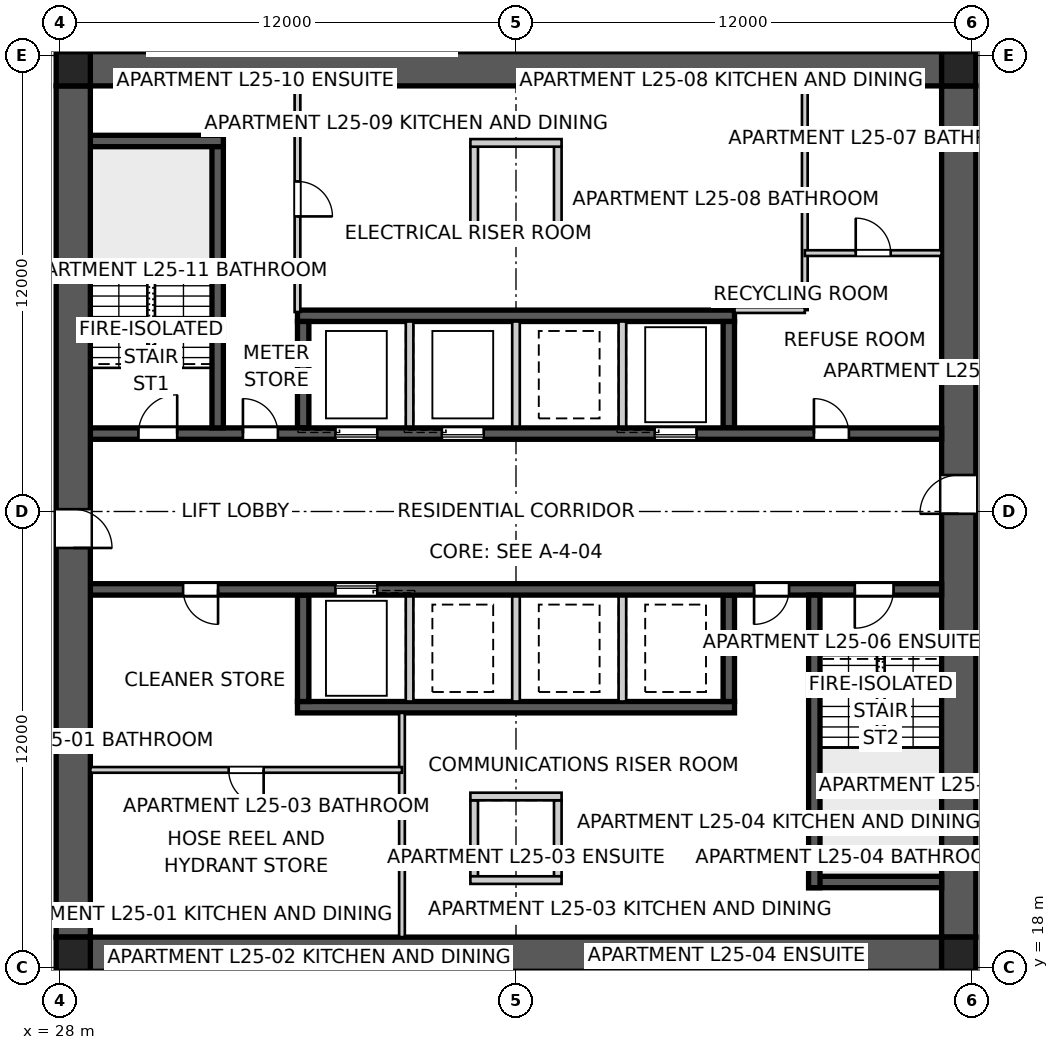
"""IFC4 building model, lengths in metres.
Left out: names, types, materials, properties, quantities, classifications, styles, units other than length and angle.
Written with IfcOpenShell. Run it as: python <this file> out.ifc"""

import sys

from ifc_helpers import new_model, si_unit, direction, frame, frame_2d, origin, origin_2d, place, context, subcontext, project, spatial, polyline, rectangle, outline, extrude, element, fill, save


model = new_model("IFC4")
c1 = context("Model", 3, precision=1e-05, world=origin(), true_north=direction((0.0, 1.0)))
c2 = subcontext(c1, "Body", "Model", "MODEL_VIEW")
j1 = project(units=[si_unit("LENGTHUNIT", "METRE"), si_unit("PLANEANGLEUNIT", "RADIAN")], contexts=[c1])
p1 = place(None, origin())
s1 = spatial("IfcSite", under=j1, at=p1, CompositionType="ELEMENT")
p2 = place(p1, origin())
s2 = spatial("IfcBuilding", under=s1, at=p2, CompositionType="ELEMENT")
p3 = place(p2, frame((0.0, 0.0, 93.0)))
s3 = spatial("IfcBuildingStorey", under=s2, at=p3, CompositionType="ELEMENT", Elevation=93.0)
for number, where, z_axis, x_axis in (
    (1, (28.8, 41.65, 0.0), (0.0, 0.0, 1.0), (1.0, 0.0, 0.0)),
    (2, (51.2, 18.35, 0.0), (0.0, 0.0, 1.0), (-1.0, 0.0, 0.0)),
):
    element("IfcWall", number, at=place(p3, frame(where, z_axis=z_axis, x_axis=x_axis)), inside=s3, PredefinedType="SHEAR", context=c2, shape_type="SweptSolid", body=[
        extrude(outline(polyline([(0.0, -0.45), (22.4, -0.45), (22.4, -0.025), (22.85, -0.025), (22.85, 0.025), (22.4, 0.025), (22.4, 0.45), (0.0, 0.45), (0.0, 0.025), (-0.45, 0.025), (-0.45, -0.025), (0.0, -0.025), (0.0, -0.45)])), origin(), (0.0, 0.0, 1.0), 3.4),
    ])
p4 = place(p3, frame((51.65, 18.8, 0.0), z_axis=(0.0, 0.0, 1.0), x_axis=(0.0, 1.0, 0.0)))
e3 = element("IfcWall", 3, at=p4, inside=s3, PredefinedType="SHEAR", context=c2, shape_type="SweptSolid", body=[
    extrude(outline(polyline([(0.0, -0.45), (22.4, -0.45), (22.4, -0.025), (22.85, -0.025), (22.85, 0.025), (22.4, 0.025), (22.4, 0.45), (0.0, 0.45), (0.0, 0.025), (-0.45, 0.025), (-0.45, -0.025), (0.0, -0.025), (0.0, -0.45)])), origin(), (0.0, 0.0, 1.0), 3.4),
])
p5 = place(p4, frame((11.14, 0.0, 0.0)))
e4 = element("IfcOpeningElement", 4, at=p5, cuts=e3, PredefinedType="OPENING", context=c2, shape_type="SweptSolid", body=[
    extrude(rectangle(XDim=1.02, YDim=2.4, at=frame_2d((0.51, 1.2))), frame((0.0, 0.46, 0.0), z_axis=(0.0, -1.0, 0.0), x_axis=(1.0, 0.0, 0.0)), (0.0, 0.0, 1.0), 0.92),
])
p6 = place(p3, frame((28.35, 41.2, 0.0), z_axis=(0.0, 0.0, 1.0), x_axis=(0.0, -1.0, 0.0)))
e5 = element("IfcWall", 5, at=p6, inside=s3, PredefinedType="SHEAR", context=c2, shape_type="SweptSolid", body=[
    extrude(outline(polyline([(0.0, -0.45), (22.4, -0.45), (22.4, -0.025), (22.85, -0.025), (22.85, 0.025), (22.4, 0.025), (22.4, 0.45), (0.0, 0.45), (0.0, 0.025), (-0.45, 0.025), (-0.45, -0.025), (0.0, -0.025), (0.0, -0.45)])), origin(), (0.0, 0.0, 1.0), 3.4),
])
p7 = place(p6, frame((11.14, 0.0, 0.0)))
e6 = element("IfcOpeningElement", 6, at=p7, cuts=e5, PredefinedType="OPENING", context=c2, shape_type="SweptSolid", body=[
    extrude(rectangle(XDim=1.02, YDim=2.4, at=frame_2d((0.51, 1.2))), frame((0.0, 0.46, 0.0), z_axis=(0.0, -1.0, 0.0), x_axis=(1.0, 0.0, 0.0)), (0.0, 0.0, 1.0), 0.92),
])
p8 = place(p3, frame((28.8, 32.05, 0.0), z_axis=(0.0, 0.0, 1.0), x_axis=(1.0, 0.0, 0.0)))
e7 = element("IfcWall", 7, at=p8, inside=s3, PredefinedType="SHEAR", context=c2, shape_type="SweptSolid", body=[
    extrude(rectangle(XDim=22.4, YDim=0.3, at=frame_2d((11.2, 0.0))), origin(), (0.0, 0.0, 1.0), 3.4),
])
p9 = place(p8, frame((19.04, 0.0, 0.0)))
e8 = element("IfcOpeningElement", 8, at=p9, cuts=e7, PredefinedType="OPENING", context=c2, shape_type="SweptSolid", body=[
    extrude(rectangle(XDim=0.92, YDim=2.1, at=frame_2d((0.46, 1.05))), frame((0.0, 0.16, 0.0), z_axis=(0.0, -1.0, 0.0), x_axis=(1.0, 0.0, 0.0)), (0.0, 0.0, 1.0), 0.32),
])
p10 = place(p8, frame((1.265, 0.0, 0.0)))
e9 = element("IfcOpeningElement", 9, at=p10, cuts=e7, PredefinedType="OPENING", context=c2, shape_type="SweptSolid", body=[
    extrude(rectangle(XDim=1.02, YDim=2.1, at=frame_2d((0.51, 1.05))), frame((0.0, 0.16, 0.0), z_axis=(0.0, -1.0, 0.0), x_axis=(1.0, 0.0, 0.0)), (0.0, 0.0, 1.0), 0.32),
])
p11 = place(p8, frame((4.015, 0.0, 0.0)))
e10 = element("IfcOpeningElement", 10, at=p11, cuts=e7, PredefinedType="OPENING", context=c2, shape_type="SweptSolid", body=[
    extrude(rectangle(XDim=0.92, YDim=2.1, at=frame_2d((0.46, 1.05))), frame((0.0, 0.16, 0.0), z_axis=(0.0, -1.0, 0.0), x_axis=(1.0, 0.0, 0.0)), (0.0, 0.0, 1.0), 0.32),
])
p12 = place(p8, frame((6.45, 0.0, 0.0)))
e11 = element("IfcOpeningElement", 11, at=p12, cuts=e7, PredefinedType="OPENING", context=c2, shape_type="SweptSolid", body=[
    extrude(rectangle(XDim=1.1, YDim=2.1, at=frame_2d((0.55, 1.05))), frame((0.0, 0.16, 0.0), z_axis=(0.0, -1.0, 0.0), x_axis=(1.0, 0.0, 0.0)), (0.0, 0.0, 1.0), 0.32),
])
p13 = place(p8, frame((9.25, 0.0, 0.0)))
e12 = element("IfcOpeningElement", 12, at=p13, cuts=e7, PredefinedType="OPENING", context=c2, shape_type="SweptSolid", body=[
    extrude(rectangle(XDim=1.1, YDim=2.1, at=frame_2d((0.55, 1.05))), frame((0.0, 0.16, 0.0), z_axis=(0.0, -1.0, 0.0), x_axis=(1.0, 0.0, 0.0)), (0.0, 0.0, 1.0), 0.32),
])
p14 = place(p8, frame((14.85, 0.0, 0.0)))
e13 = element("IfcOpeningElement", 13, at=p14, cuts=e7, PredefinedType="OPENING", context=c2, shape_type="SweptSolid", body=[
    extrude(rectangle(XDim=1.1, YDim=2.1, at=frame_2d((0.55, 1.05))), frame((0.0, 0.16, 0.0), z_axis=(0.0, -1.0, 0.0), x_axis=(1.0, 0.0, 0.0)), (0.0, 0.0, 1.0), 0.32),
])
p15 = place(p3, frame((51.2, 27.95, 0.0), z_axis=(0.0, 0.0, 1.0), x_axis=(-1.0, 0.0, 0.0)))
e14 = element("IfcWall", 14, at=p15, inside=s3, PredefinedType="SHEAR", context=c2, shape_type="SweptSolid", body=[
    extrude(rectangle(XDim=22.4, YDim=0.3, at=frame_2d((11.2, 0.0))), origin(), (0.0, 0.0, 1.0), 3.4),
])
p16 = place(p15, frame((19.04, 0.0, 0.0)))
e15 = element("IfcOpeningElement", 15, at=p16, cuts=e14, PredefinedType="OPENING", context=c2, shape_type="SweptSolid", body=[
    extrude(rectangle(XDim=0.92, YDim=2.1, at=frame_2d((0.46, 1.05))), frame((0.0, 0.16, 0.0), z_axis=(0.0, -1.0, 0.0), x_axis=(1.0, 0.0, 0.0)), (0.0, 0.0, 1.0), 0.32),
])
p17 = place(p15, frame((1.265, 0.0, 0.0)))
e16 = element("IfcOpeningElement", 16, at=p17, cuts=e14, PredefinedType="OPENING", context=c2, shape_type="SweptSolid", body=[
    extrude(rectangle(XDim=1.02, YDim=2.1, at=frame_2d((0.51, 1.05))), frame((0.0, 0.16, 0.0), z_axis=(0.0, -1.0, 0.0), x_axis=(1.0, 0.0, 0.0)), (0.0, 0.0, 1.0), 0.32),
])
p18 = place(p15, frame((4.015, 0.0, 0.0)))
e17 = element("IfcOpeningElement", 17, at=p18, cuts=e14, PredefinedType="OPENING", context=c2, shape_type="SweptSolid", body=[
    extrude(rectangle(XDim=0.92, YDim=2.1, at=frame_2d((0.46, 1.05))), frame((0.0, 0.16, 0.0), z_axis=(0.0, -1.0, 0.0), x_axis=(1.0, 0.0, 0.0)), (0.0, 0.0, 1.0), 0.32),
])
p19 = place(p15, frame((14.85, 0.0, 0.0)))
e18 = element("IfcOpeningElement", 18, at=p19, cuts=e14, PredefinedType="OPENING", context=c2, shape_type="SweptSolid", body=[
    extrude(rectangle(XDim=1.1, YDim=2.1, at=frame_2d((0.55, 1.05))), frame((0.0, 0.16, 0.0), z_axis=(0.0, -1.0, 0.0), x_axis=(1.0, 0.0, 0.0)), (0.0, 0.0, 1.0), 0.32),
])
for number, where, z_axis, x_axis in (
    (19, (34.25, 35.15, 0.0), (0.0, 0.0, 1.0), (1.0, 0.0, 0.0)),
    (20, (45.75, 24.85, 0.0), (0.0, 0.0, 1.0), (-1.0, 0.0, 0.0)),
):
    element("IfcWall", number, at=place(p3, frame(where, z_axis=z_axis, x_axis=x_axis)), inside=s3, PredefinedType="SHEAR", context=c2, shape_type="SweptSolid", body=[
        extrude(rectangle(XDim=11.5, YDim=0.3, at=frame_2d((5.75, 0.0))), origin(), (0.0, 0.0, 1.0), 3.4),
    ])
for number, where, z_axis, x_axis in (
    (21, (34.4, 32.2, 0.0), (0.0, 0.0, 1.0), (0.0, 1.0, 0.0)),
    (22, (45.6, 27.8, 0.0), (0.0, 0.0, 1.0), (0.0, -1.0, 0.0)),
):
    element("IfcWall", number, at=place(p3, frame(where, z_axis=z_axis, x_axis=x_axis)), inside=s3, PredefinedType="SHEAR", context=c2, shape_type="SweptSolid", body=[
        extrude(rectangle(XDim=2.8, YDim=0.3, at=frame_2d((1.4, 0.0))), origin(), (0.0, 0.0, 1.0), 3.4),
    ])
for number, where, z_axis, x_axis in (
    (23, (37.2, 32.2, 0.0), (0.0, 0.0, 1.0), (0.0, 1.0, 0.0)),
    (24, (42.8, 27.8, 0.0), (0.0, 0.0, 1.0), (0.0, -1.0, 0.0)),
    (25, (40.0, 32.2, 0.0), (0.0, 0.0, 1.0), (0.0, 1.0, 0.0)),
    (26, (40.0, 27.8, 0.0), (0.0, 0.0, 1.0), (0.0, -1.0, 0.0)),
    (27, (42.8, 32.2, 0.0), (0.0, 0.0, 1.0), (0.0, 1.0, 0.0)),
    (28, (37.2, 27.8, 0.0), (0.0, 0.0, 1.0), (0.0, -1.0, 0.0)),
):
    element("IfcWall", number, at=place(p3, frame(where, z_axis=z_axis, x_axis=x_axis)), inside=s3, PredefinedType="SOLIDWALL", context=c2, shape_type="SweptSolid", body=[
        extrude(rectangle(XDim=2.8, YDim=0.2, at=frame_2d((1.4, 0.0))), origin(), (0.0, 0.0, 1.0), 3.4),
    ])
for number, where, z_axis, x_axis in (
    (29, (45.6, 32.2, 0.0), (0.0, 0.0, 1.0), (0.0, 1.0, 0.0)),
    (30, (34.4, 27.8, 0.0), (0.0, 0.0, 1.0), (0.0, -1.0, 0.0)),
):
    element("IfcWall", number, at=place(p3, frame(where, z_axis=z_axis, x_axis=x_axis)), inside=s3, PredefinedType="SHEAR", context=c2, shape_type="SweptSolid", body=[
        extrude(rectangle(XDim=2.8, YDim=0.3, at=frame_2d((1.4, 0.0))), origin(), (0.0, 0.0, 1.0), 3.4),
    ])
p20 = place(p3, frame((32.15, 32.2, 0.0), z_axis=(0.0, 0.0, 1.0), x_axis=(0.0, 1.0, 0.0)))
e31 = element("IfcWall", 31, at=p20, inside=s3, PredefinedType="SHEAR", context=c2, shape_type="SweptSolid", body=[
    extrude(rectangle(XDim=7.7, YDim=0.3, at=frame_2d((3.85, 0.0))), origin(), (0.0, 0.0, 1.0), 3.4),
])
p21 = place(p3, frame((28.8, 39.75, 0.0), z_axis=(0.0, 0.0, 1.0), x_axis=(1.0, 0.0, 0.0)))
e32 = element("IfcWall", 32, at=p21, inside=s3, PredefinedType="SHEAR", context=c2, shape_type="SweptSolid", body=[
    extrude(rectangle(XDim=3.5, YDim=0.3, at=frame_2d((1.75, 0.0))), origin(), (0.0, 0.0, 1.0), 3.4),
])
p22 = place(p3, frame((47.85, 27.8, 0.0), z_axis=(0.0, 0.0, 1.0), x_axis=(0.0, -1.0, 0.0)))
e33 = element("IfcWall", 33, at=p22, inside=s3, PredefinedType="SHEAR", context=c2, shape_type="SweptSolid", body=[
    extrude(rectangle(XDim=7.7, YDim=0.3, at=frame_2d((3.85, 0.0))), origin(), (0.0, 0.0, 1.0), 3.4),
])
p23 = place(p3, frame((51.2, 20.25, 0.0), z_axis=(0.0, 0.0, 1.0), x_axis=(-1.0, 0.0, 0.0)))
e34 = element("IfcWall", 34, at=p23, inside=s3, PredefinedType="SHEAR", context=c2, shape_type="SweptSolid", body=[
    extrude(rectangle(XDim=3.5, YDim=0.3, at=frame_2d((1.75, 0.0))), origin(), (0.0, 0.0, 1.0), 3.4),
])
for number, where, z_axis, x_axis in (
    (35, (38.9, 37.6, 0.0), (0.0, 0.0, 1.0), (0.0, 1.0, 0.0)),
    (36, (41.1, 37.6, 0.0), (0.0, 0.0, 1.0), (0.0, 1.0, 0.0)),
):
    element("IfcWall", number, at=place(p3, frame(where, z_axis=z_axis, x_axis=x_axis)), inside=s3, PredefinedType="SOLIDWALL", context=c2, shape_type="SweptSolid", body=[
        extrude(rectangle(XDim=2.0, YDim=0.2, at=frame_2d((1.0, 0.0))), origin(), (0.0, 0.0, 1.0), 3.4),
    ])
for number, where, z_axis, x_axis in (
    (37, (38.8, 37.5, 0.0), (0.0, 0.0, 1.0), (1.0, 0.0, 0.0)),
    (38, (38.8, 39.7, 0.0), (0.0, 0.0, 1.0), (1.0, 0.0, 0.0)),
):
    element("IfcWall", number, at=place(p3, frame(where, z_axis=z_axis, x_axis=x_axis)), inside=s3, PredefinedType="SOLIDWALL", context=c2, shape_type="SweptSolid", body=[
        extrude(rectangle(XDim=2.4, YDim=0.2, at=frame_2d((1.2, 0.0))), origin(), (0.0, 0.0, 1.0), 3.4),
    ])
for number, where, z_axis, x_axis in (
    (39, (38.9, 22.4, 0.0), (0.0, 0.0, 1.0), (0.0, -1.0, 0.0)),
    (40, (41.1, 22.4, 0.0), (0.0, 0.0, 1.0), (0.0, -1.0, 0.0)),
):
    element("IfcWall", number, at=place(p3, frame(where, z_axis=z_axis, x_axis=x_axis)), inside=s3, PredefinedType="SOLIDWALL", context=c2, shape_type="SweptSolid", body=[
        extrude(rectangle(XDim=2.0, YDim=0.2, at=frame_2d((1.0, 0.0))), origin(), (0.0, 0.0, 1.0), 3.4),
    ])
for number, where, z_axis, x_axis in (
    (41, (38.8, 22.5, 0.0), (0.0, 0.0, 1.0), (1.0, 0.0, 0.0)),
    (42, (38.8, 20.3, 0.0), (0.0, 0.0, 1.0), (1.0, 0.0, 0.0)),
):
    element("IfcWall", number, at=place(p3, frame(where, z_axis=z_axis, x_axis=x_axis)), inside=s3, PredefinedType="SOLIDWALL", context=c2, shape_type="SweptSolid", body=[
        extrude(rectangle(XDim=2.4, YDim=0.2, at=frame_2d((1.2, 0.0))), origin(), (0.0, 0.0, 1.0), 3.4),
    ])
for number, where, z_axis, x_axis in (
    (43, (28.35, 18.35, 0.0), (0.0, 0.0, 1.0), (1.0, 0.0, 0.0)),
    (44, (51.65, 18.35, 0.0), (0.0, 0.0, 1.0), (1.0, 0.0, 0.0)),
    (45, (51.65, 41.65, 0.0), (0.0, 0.0, 1.0), (1.0, 0.0, 0.0)),
    (46, (28.35, 41.65, 0.0), (0.0, 0.0, 1.0), (1.0, 0.0, 0.0)),
):
    element("IfcColumn", number, at=place(p3, frame(where, z_axis=z_axis, x_axis=x_axis)), inside=s3, PredefinedType="COLUMN", context=c2, shape_type="SweptSolid", body=[
        extrude(rectangle(XDim=0.9, YDim=0.9, at=origin_2d()), origin(), (0.0, 0.0, 1.0), 3.4),
    ])
p24 = place(p3, frame((34.25, 41.2, 0.0), z_axis=(0.0, 0.0, 1.0), x_axis=(0.0, -1.0, 0.0)))
e47 = element("IfcWall", 47, at=p24, inside=s3, PredefinedType="SOLIDWALL", context=c2, shape_type="SweptSolid", body=[
    extrude(rectangle(XDim=5.95, YDim=0.15, at=frame_2d((2.975, 0.0))), origin(), (0.0, 0.0, 1.0), 3.25),
])
p25 = place(p24, frame((2.515, 0.0, 0.0)))
e48 = element("IfcOpeningElement", 48, at=p25, cuts=e47, PredefinedType="OPENING", context=c2, shape_type="SweptSolid", body=[
    extrude(rectangle(XDim=0.92, YDim=2.1, at=frame_2d((0.46, 1.05))), frame((0.0, 0.085, 0.0), z_axis=(0.0, -1.0, 0.0), x_axis=(1.0, 0.0, 0.0)), (0.0, 0.0, 1.0), 0.17),
])
p26 = place(p3, frame((47.6, 41.2, 0.0), z_axis=(0.0, 0.0, 1.0), x_axis=(0.0, -1.0, 0.0)))
e49 = element("IfcWall", 49, at=p26, inside=s3, PredefinedType="SOLIDWALL", context=c2, shape_type="SweptSolid", body=[
    extrude(rectangle(XDim=5.9, YDim=0.15, at=frame_2d((2.95, 0.0))), origin(), (0.0, 0.0, 1.0), 3.25),
])
p27 = place(p3, frame((47.6, 35.3, 0.0), z_axis=(0.0, 0.0, 1.0), x_axis=(-1.0, 0.0, 0.0)))
e50 = element("IfcWall", 50, at=p27, inside=s3, PredefinedType="SOLIDWALL", context=c2, shape_type="SweptSolid", body=[
    extrude(rectangle(XDim=1.85, YDim=0.15, at=frame_2d((0.925, 0.0))), origin(), (0.0, 0.0, 1.0), 3.25),
])
p28 = place(p3, frame((47.6, 36.8, 0.0), z_axis=(0.0, 0.0, 1.0), x_axis=(1.0, 0.0, 0.0)))
e51 = element("IfcWall", 51, at=p28, inside=s3, PredefinedType="SOLIDWALL", context=c2, shape_type="SweptSolid", body=[
    extrude(rectangle(XDim=3.6, YDim=0.15, at=frame_2d((1.8, 0.0))), origin(), (0.0, 0.0, 1.0), 3.25),
])
p29 = place(p28, frame((1.34, 0.0, 0.0)))
e52 = element("IfcOpeningElement", 52, at=p29, cuts=e51, PredefinedType="OPENING", context=c2, shape_type="SweptSolid", body=[
    extrude(rectangle(XDim=0.92, YDim=2.1, at=frame_2d((0.46, 1.05))), frame((0.0, 0.085, 0.0), z_axis=(0.0, -1.0, 0.0), x_axis=(1.0, 0.0, 0.0)), (0.0, 0.0, 1.0), 0.17),
])
p30 = place(p3, frame((37.0, 18.8, 0.0), z_axis=(0.0, 0.0, 1.0), x_axis=(0.0, 1.0, 0.0)))
e53 = element("IfcWall", 53, at=p30, inside=s3, PredefinedType="SOLIDWALL", context=c2, shape_type="SweptSolid", body=[
    extrude(rectangle(XDim=5.9, YDim=0.15, at=frame_2d((2.95, 0.0))), origin(), (0.0, 0.0, 1.0), 3.25),
])
p31 = place(p3, frame((37.0, 23.2, 0.0), z_axis=(0.0, 0.0, 1.0), x_axis=(-1.0, 0.0, 0.0)))
e54 = element("IfcWall", 54, at=p31, inside=s3, PredefinedType="SOLIDWALL", context=c2, shape_type="SweptSolid", body=[
    extrude(rectangle(XDim=8.2, YDim=0.15, at=frame_2d((4.1, 0.0))), origin(), (0.0, 0.0, 1.0), 3.25),
])
p32 = place(p31, frame((3.64, 0.0, 0.0)))
e55 = element("IfcOpeningElement", 55, at=p32, cuts=e54, PredefinedType="OPENING", context=c2, shape_type="SweptSolid", body=[
    extrude(rectangle(XDim=0.92, YDim=2.1, at=frame_2d((0.46, 1.05))), frame((0.0, 0.085, 0.0), z_axis=(0.0, -1.0, 0.0), x_axis=(1.0, 0.0, 0.0)), (0.0, 0.0, 1.0), 0.17),
])
p33 = place(p9, origin())
e56 = element("IfcDoor", 56, at=p33, inside=s3, OperationType="SINGLE_SWING_LEFT", PredefinedType="DOOR", context=c2, shape_type="SweptSolid", body=[
    extrude(rectangle(XDim=0.92, YDim=2.1, at=frame_2d((0.46, 1.05))), frame((0.0, 0.025, 0.0), z_axis=(0.0, -1.0, 0.0), x_axis=(1.0, 0.0, 0.0)), (0.0, 0.0, 1.0), 0.05),
])
fill(e8, e56)
p34 = place(p16, origin())
e57 = element("IfcDoor", 57, at=p34, inside=s3, OperationType="SINGLE_SWING_LEFT", PredefinedType="DOOR", context=c2, shape_type="SweptSolid", body=[
    extrude(rectangle(XDim=0.92, YDim=2.1, at=frame_2d((0.46, 1.05))), frame((0.0, 0.025, 0.0), z_axis=(0.0, -1.0, 0.0), x_axis=(1.0, 0.0, 0.0)), (0.0, 0.0, 1.0), 0.05),
])
fill(e15, e57)
p35 = place(p17, origin())
e58 = element("IfcDoor", 58, at=p35, inside=s3, OperationType="SINGLE_SWING_RIGHT", PredefinedType="DOOR", context=c2, shape_type="SweptSolid", body=[
    extrude(rectangle(XDim=1.02, YDim=2.1, at=frame_2d((0.51, 1.05))), frame((0.0, 0.025, 0.0), z_axis=(0.0, -1.0, 0.0), x_axis=(1.0, 0.0, 0.0)), (0.0, 0.0, 1.0), 0.05),
])
fill(e16, e58)
p36 = place(p10, origin())
e59 = element("IfcDoor", 59, at=p36, inside=s3, OperationType="SINGLE_SWING_RIGHT", PredefinedType="DOOR", context=c2, shape_type="SweptSolid", body=[
    extrude(rectangle(XDim=1.02, YDim=2.1, at=frame_2d((0.51, 1.05))), frame((0.0, 0.025, 0.0), z_axis=(0.0, -1.0, 0.0), x_axis=(1.0, 0.0, 0.0)), (0.0, 0.0, 1.0), 0.05),
])
fill(e9, e59)
p37 = place(p11, origin())
e60 = element("IfcDoor", 60, at=p37, inside=s3, OperationType="SINGLE_SWING_LEFT", PredefinedType="DOOR", context=c2, shape_type="SweptSolid", body=[
    extrude(rectangle(XDim=0.92, YDim=2.1, at=frame_2d((0.46, 1.05))), frame((0.0, 0.025, 0.0), z_axis=(0.0, -1.0, 0.0), x_axis=(1.0, 0.0, 0.0)), (0.0, 0.0, 1.0), 0.05),
])
fill(e10, e60)
p38 = place(p18, origin())
e61 = element("IfcDoor", 61, at=p38, inside=s3, OperationType="SINGLE_SWING_RIGHT", PredefinedType="DOOR", context=c2, shape_type="SweptSolid", body=[
    extrude(rectangle(XDim=0.92, YDim=2.1, at=frame_2d((0.46, 1.05))), frame((0.0, 0.025, 0.0), z_axis=(0.0, -1.0, 0.0), x_axis=(1.0, 0.0, 0.0)), (0.0, 0.0, 1.0), 0.05),
])
fill(e17, e61)
p39 = place(p29, origin())
e62 = element("IfcDoor", 62, at=p39, inside=s3, OperationType="SINGLE_SWING_LEFT", PredefinedType="DOOR", context=c2, shape_type="SweptSolid", body=[
    extrude(rectangle(XDim=0.92, YDim=2.1, at=frame_2d((0.46, 1.05))), frame((0.0, 0.025, 0.0), z_axis=(0.0, -1.0, 0.0), x_axis=(1.0, 0.0, 0.0)), (0.0, 0.0, 1.0), 0.05),
])
fill(e52, e62)
p40 = place(p32, origin())
e63 = element("IfcDoor", 63, at=p40, inside=s3, OperationType="SINGLE_SWING_LEFT", PredefinedType="DOOR", context=c2, shape_type="SweptSolid", body=[
    extrude(rectangle(XDim=0.92, YDim=2.1, at=frame_2d((0.46, 1.05))), frame((0.0, 0.025, 0.0), z_axis=(0.0, -1.0, 0.0), x_axis=(1.0, 0.0, 0.0)), (0.0, 0.0, 1.0), 0.05),
])
fill(e55, e63)
p41 = place(p25, origin())
e64 = element("IfcDoor", 64, at=p41, inside=s3, OperationType="SINGLE_SWING_RIGHT", PredefinedType="DOOR", context=c2, shape_type="SweptSolid", body=[
    extrude(rectangle(XDim=0.92, YDim=2.1, at=frame_2d((0.46, 1.05))), frame((0.0, 0.025, 0.0), z_axis=(0.0, -1.0, 0.0), x_axis=(1.0, 0.0, 0.0)), (0.0, 0.0, 1.0), 0.05),
])
fill(e48, e64)
p42 = place(p5, origin())
e65 = element("IfcDoor", 65, at=p42, inside=s3, OperationType="SINGLE_SWING_LEFT", PredefinedType="DOOR", context=c2, shape_type="SweptSolid", body=[
    extrude(rectangle(XDim=1.02, YDim=2.4, at=frame_2d((0.51, 1.2))), frame((0.0, 0.025, 0.0), z_axis=(0.0, -1.0, 0.0), x_axis=(1.0, 0.0, 0.0)), (0.0, 0.0, 1.0), 0.05),
])
fill(e4, e65)
p43 = place(p7, origin())
e66 = element("IfcDoor", 66, at=p43, inside=s3, OperationType="SINGLE_SWING_RIGHT", PredefinedType="DOOR", context=c2, shape_type="SweptSolid", body=[
    extrude(rectangle(XDim=1.02, YDim=2.4, at=frame_2d((0.51, 1.2))), frame((0.0, 0.025, 0.0), z_axis=(0.0, -1.0, 0.0), x_axis=(1.0, 0.0, 0.0)), (0.0, 0.0, 1.0), 0.05),
])
fill(e6, e66)
p44 = place(p12, origin())
e67 = element("IfcDoor", 67, at=p44, inside=s3, OperationType="SLIDING_TO_LEFT", PredefinedType="DOOR", context=c2, shape_type="SweptSolid", body=[
    extrude(rectangle(XDim=1.1, YDim=2.1, at=frame_2d((0.55, 1.05))), frame((0.0, 0.025, 0.0), z_axis=(0.0, -1.0, 0.0), x_axis=(1.0, 0.0, 0.0)), (0.0, 0.0, 1.0), 0.05),
])
fill(e11, e67)
p45 = place(p13, origin())
e68 = element("IfcDoor", 68, at=p45, inside=s3, OperationType="SLIDING_TO_LEFT", PredefinedType="DOOR", context=c2, shape_type="SweptSolid", body=[
    extrude(rectangle(XDim=1.1, YDim=2.1, at=frame_2d((0.55, 1.05))), frame((0.0, 0.025, 0.0), z_axis=(0.0, -1.0, 0.0), x_axis=(1.0, 0.0, 0.0)), (0.0, 0.0, 1.0), 0.05),
])
fill(e12, e68)
p46 = place(p14, origin())
e69 = element("IfcDoor", 69, at=p46, inside=s3, OperationType="SLIDING_TO_LEFT", PredefinedType="DOOR", context=c2, shape_type="SweptSolid", body=[
    extrude(rectangle(XDim=1.1, YDim=2.1, at=frame_2d((0.55, 1.05))), frame((0.0, 0.025, 0.0), z_axis=(0.0, -1.0, 0.0), x_axis=(1.0, 0.0, 0.0)), (0.0, 0.0, 1.0), 0.05),
])
fill(e13, e69)
p47 = place(p19, origin())
e70 = element("IfcDoor", 70, at=p47, inside=s3, OperationType="SLIDING_TO_LEFT", PredefinedType="DOOR", context=c2, shape_type="SweptSolid", body=[
    extrude(rectangle(XDim=1.1, YDim=2.1, at=frame_2d((0.55, 1.05))), frame((0.0, 0.025, 0.0), z_axis=(0.0, -1.0, 0.0), x_axis=(1.0, 0.0, 0.0)), (0.0, 0.0, 1.0), 0.05),
])
fill(e18, e70)
save(model, sys.argv[1])
